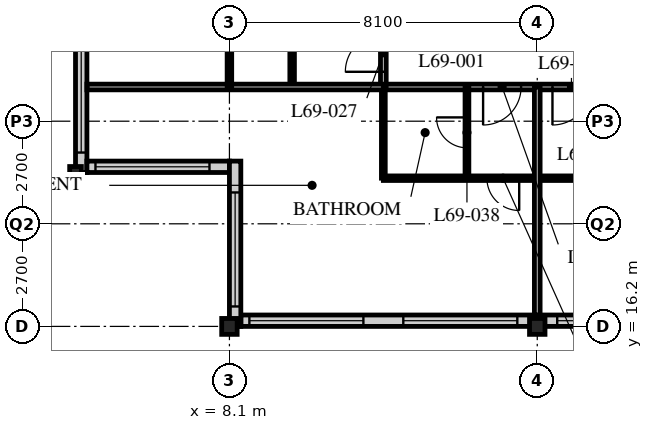
"""IFC4 building model, lengths in metres.
Left out: names, types, materials, properties, quantities, classifications, styles, units other than length and angle.
Written with IfcOpenShell. Run it as: python <this file> out.ifc"""

import sys

from ifc_helpers import new_model, si_unit, direction, frame, frame_2d, origin, origin_2d, place, context, subcontext, project, spatial, rectangle, i_section, extrude, element, fill, save


model = new_model("IFC4")
c1 = context("Model", 3, precision=1e-05, world=origin(), true_north=direction((0.0, 1.0)))
c2 = subcontext(c1, "Body", "Model", "MODEL_VIEW")
j1 = project(units=[si_unit("LENGTHUNIT", "METRE"), si_unit("PLANEANGLEUNIT", "RADIAN")], contexts=[c1])
p1 = place(None, origin())
s1 = spatial("IfcSite", under=j1, at=p1, CompositionType="ELEMENT")
p2 = place(p1, origin())
s2 = spatial("IfcBuilding", under=s1, at=p2, CompositionType="ELEMENT")
p3 = place(p2, frame((0.0, 0.0, 269.7)))
s3 = spatial("IfcBuildingStorey", under=s2, at=p3, CompositionType="ELEMENT", Elevation=269.7)
p4 = place(p3, frame((4.05, 20.25, 0.0), z_axis=(0.0, 0.0, 1.0), x_axis=(1.0, 0.0, 0.0)))
e1 = element("IfcColumn", 1, at=p4, inside=s3, PredefinedType="COLUMN", context=c2, shape_type="SweptSolid", body=[
    extrude(i_section(OverallWidth=0.307, OverallDepth=0.314, WebThickness=0.012, FlangeThickness=0.019, FilletRadius=0.015, at=origin_2d()), origin(), (0.0, 0.0, 1.0), 3.9),
])
for number, where, z_axis, x_axis in (
    (2, (8.1, 16.2, 0.0), (0.0, 0.0, 1.0), (1.0, 0.0, 0.0)),
    (3, (16.2, 16.2, 0.0), (0.0, 0.0, 1.0), (1.0, 0.0, 0.0)),
):
    element("IfcColumn", number, at=place(p3, frame(where, z_axis=z_axis, x_axis=x_axis)), inside=s3, PredefinedType="COLUMN", context=c2, shape_type="SweptSolid", body=[
        extrude(i_section(OverallWidth=0.407, OverallDepth=0.419, WebThickness=0.031, FlangeThickness=0.049, FilletRadius=0.015, at=origin_2d()), origin(), (0.0, 0.0, 1.0), 3.9),
    ])
p5 = place(p3, frame((8.4, 16.35, 0.0), z_axis=(0.0, 0.0, 1.0), x_axis=(1.0, 0.0, 0.0)))
e4 = element("IfcWall", 4, at=p5, inside=s3, PredefinedType="SOLIDWALL", context=c2, shape_type="SweptSolid", body=[
    extrude(rectangle(XDim=40.2, YDim=0.3, at=frame_2d((20.1, 0.0))), origin(), (0.0, 0.0, 1.0), 3.69),
])
p6 = place(p5, frame((0.225, 0.0, 0.6)))
e5 = element("IfcOpeningElement", 5, at=p6, cuts=e4, PredefinedType="OPENING", context=c2, shape_type="SweptSolid", body=[
    extrude(rectangle(XDim=3.0, YDim=2.4, at=frame_2d((1.5, 1.2))), frame((0.0, 0.16, 0.0), z_axis=(0.0, -1.0, 0.0), x_axis=(1.0, 0.0, 0.0)), (0.0, 0.0, 1.0), 0.32),
])
p7 = place(p5, frame((4.275, 0.0, 0.6)))
e6 = element("IfcOpeningElement", 6, at=p7, cuts=e4, PredefinedType="OPENING", context=c2, shape_type="SweptSolid", body=[
    extrude(rectangle(XDim=3.0, YDim=2.4, at=frame_2d((1.5, 1.2))), frame((0.0, 0.16, 0.0), z_axis=(0.0, -1.0, 0.0), x_axis=(1.0, 0.0, 0.0)), (0.0, 0.0, 1.0), 0.32),
])
p8 = place(p5, frame((8.325, 0.0, 0.6)))
e7 = element("IfcOpeningElement", 7, at=p8, cuts=e4, PredefinedType="OPENING", context=c2, shape_type="SweptSolid", body=[
    extrude(rectangle(XDim=3.0, YDim=2.4, at=frame_2d((1.5, 1.2))), frame((0.0, 0.16, 0.0), z_axis=(0.0, -1.0, 0.0), x_axis=(1.0, 0.0, 0.0)), (0.0, 0.0, 1.0), 0.32),
])
p9 = place(p5, frame((12.375, 0.0, 0.6)))
e8 = element("IfcOpeningElement", 8, at=p9, cuts=e4, PredefinedType="OPENING", context=c2, shape_type="SweptSolid", body=[
    extrude(rectangle(XDim=3.0, YDim=2.4, at=frame_2d((1.5, 1.2))), frame((0.0, 0.16, 0.0), z_axis=(0.0, -1.0, 0.0), x_axis=(1.0, 0.0, 0.0)), (0.0, 0.0, 1.0), 0.32),
])
p10 = place(p5, frame((16.425, 0.0, 0.6)))
e9 = element("IfcOpeningElement", 9, at=p10, cuts=e4, PredefinedType="OPENING", context=c2, shape_type="SweptSolid", body=[
    extrude(rectangle(XDim=3.0, YDim=2.4, at=frame_2d((1.5, 1.2))), frame((0.0, 0.16, 0.0), z_axis=(0.0, -1.0, 0.0), x_axis=(1.0, 0.0, 0.0)), (0.0, 0.0, 1.0), 0.32),
])
p11 = place(p5, frame((20.475, 0.0, 0.6)))
e10 = element("IfcOpeningElement", 10, at=p11, cuts=e4, PredefinedType="OPENING", context=c2, shape_type="SweptSolid", body=[
    extrude(rectangle(XDim=3.0, YDim=2.4, at=frame_2d((1.5, 1.2))), frame((0.0, 0.16, 0.0), z_axis=(0.0, -1.0, 0.0), x_axis=(1.0, 0.0, 0.0)), (0.0, 0.0, 1.0), 0.32),
])
p12 = place(p5, frame((24.525, 0.0, 0.6)))
e11 = element("IfcOpeningElement", 11, at=p12, cuts=e4, PredefinedType="OPENING", context=c2, shape_type="SweptSolid", body=[
    extrude(rectangle(XDim=3.0, YDim=2.4, at=frame_2d((1.5, 1.2))), frame((0.0, 0.16, 0.0), z_axis=(0.0, -1.0, 0.0), x_axis=(1.0, 0.0, 0.0)), (0.0, 0.0, 1.0), 0.32),
])
p13 = place(p5, frame((28.575, 0.0, 0.6)))
e12 = element("IfcOpeningElement", 12, at=p13, cuts=e4, PredefinedType="OPENING", context=c2, shape_type="SweptSolid", body=[
    extrude(rectangle(XDim=3.0, YDim=2.4, at=frame_2d((1.5, 1.2))), frame((0.0, 0.16, 0.0), z_axis=(0.0, -1.0, 0.0), x_axis=(1.0, 0.0, 0.0)), (0.0, 0.0, 1.0), 0.32),
])
p14 = place(p5, frame((32.625, 0.0, 0.6)))
e13 = element("IfcOpeningElement", 13, at=p14, cuts=e4, PredefinedType="OPENING", context=c2, shape_type="SweptSolid", body=[
    extrude(rectangle(XDim=3.0, YDim=2.4, at=frame_2d((1.5, 1.2))), frame((0.0, 0.16, 0.0), z_axis=(0.0, -1.0, 0.0), x_axis=(1.0, 0.0, 0.0)), (0.0, 0.0, 1.0), 0.32),
])
p15 = place(p5, frame((36.675, 0.0, 0.6)))
e14 = element("IfcOpeningElement", 14, at=p15, cuts=e4, PredefinedType="OPENING", context=c2, shape_type="SweptSolid", body=[
    extrude(rectangle(XDim=3.0, YDim=2.4, at=frame_2d((1.5, 1.2))), frame((0.0, 0.16, 0.0), z_axis=(0.0, -1.0, 0.0), x_axis=(1.0, 0.0, 0.0)), (0.0, 0.0, 1.0), 0.32),
])
p16 = place(p3, frame((4.2, 24.6, 0.0), z_axis=(0.0, 0.0, 1.0), x_axis=(0.0, -1.0, 0.0)))
e15 = element("IfcWall", 15, at=p16, inside=s3, PredefinedType="SOLIDWALL", context=c2, shape_type="SweptSolid", body=[
    extrude(rectangle(XDim=4.35, YDim=0.3, at=frame_2d((2.175, 0.0))), origin(), (0.0, 0.0, 1.0), 3.69),
])
p17 = place(p16, frame((0.825, 0.0, 0.6)))
e16 = element("IfcOpeningElement", 16, at=p17, cuts=e15, PredefinedType="OPENING", context=c2, shape_type="SweptSolid", body=[
    extrude(rectangle(XDim=3.0, YDim=2.3, at=frame_2d((1.5, 1.15))), frame((0.0, 0.16, 0.0), z_axis=(0.0, -1.0, 0.0), x_axis=(1.0, 0.0, 0.0)), (0.0, 0.0, 1.0), 0.32),
])
p18 = place(p3, frame((4.35, 20.4, 0.0), z_axis=(0.0, 0.0, 1.0), x_axis=(1.0, 0.0, 0.0)))
e17 = element("IfcWall", 17, at=p18, inside=s3, PredefinedType="SOLIDWALL", context=c2, shape_type="SweptSolid", body=[
    extrude(rectangle(XDim=3.75, YDim=0.3, at=frame_2d((1.875, 0.0))), origin(), (0.0, 0.0, 1.0), 3.69),
])
p19 = place(p18, frame((0.225, 0.0, 0.6)))
e18 = element("IfcOpeningElement", 18, at=p19, cuts=e17, PredefinedType="OPENING", context=c2, shape_type="SweptSolid", body=[
    extrude(rectangle(XDim=3.0, YDim=2.3, at=frame_2d((1.5, 1.15))), frame((0.0, 0.16, 0.0), z_axis=(0.0, -1.0, 0.0), x_axis=(1.0, 0.0, 0.0)), (0.0, 0.0, 1.0), 0.32),
])
p20 = place(p3, frame((8.25, 20.55, 0.0), z_axis=(0.0, 0.0, 1.0), x_axis=(0.0, -1.0, 0.0)))
e19 = element("IfcWall", 19, at=p20, inside=s3, PredefinedType="SOLIDWALL", context=c2, shape_type="SweptSolid", body=[
    extrude(rectangle(XDim=4.35, YDim=0.3, at=frame_2d((2.175, 0.0))), origin(), (0.0, 0.0, 1.0), 3.69),
])
p21 = place(p20, frame((0.825, 0.0, 0.6)))
e20 = element("IfcOpeningElement", 20, at=p21, cuts=e19, PredefinedType="OPENING", context=c2, shape_type="SweptSolid", body=[
    extrude(rectangle(XDim=3.0, YDim=2.3, at=frame_2d((1.5, 1.15))), frame((0.0, 0.16, 0.0), z_axis=(0.0, -1.0, 0.0), x_axis=(1.0, 0.0, 0.0)), (0.0, 0.0, 1.0), 0.32),
])
p22 = place(p3, frame((12.15, 22.5, 0.0), z_axis=(0.0, 0.0, 1.0), x_axis=(1.0, 0.0, 0.0)))
e21 = element("IfcWall", 21, at=p22, inside=s3, PredefinedType="PARTITIONING", context=c2, shape_type="SweptSolid", body=[
    extrude(rectangle(XDim=24.3, YDim=0.15, at=frame_2d((12.15, 0.0))), origin(), (0.0, 0.0, 1.0), 3.69),
])
p23 = place(p22, frame((4.45, 0.0, 0.0)))
e22 = element("IfcOpeningElement", 22, at=p23, cuts=e21, PredefinedType="OPENING", context=c2, shape_type="SweptSolid", body=[
    extrude(rectangle(XDim=1.0, YDim=2.1, at=frame_2d((0.5, 1.05))), frame((0.0, 0.085, 0.0), z_axis=(0.0, -1.0, 0.0), x_axis=(1.0, 0.0, 0.0)), (0.0, 0.0, 1.0), 0.17),
])
p24 = place(p22, frame((12.55, 0.0, 0.0)))
e23 = element("IfcOpeningElement", 23, at=p24, cuts=e21, PredefinedType="OPENING", context=c2, shape_type="SweptSolid", body=[
    extrude(rectangle(XDim=1.0, YDim=2.1, at=frame_2d((0.5, 1.05))), frame((0.0, 0.085, 0.0), z_axis=(0.0, -1.0, 0.0), x_axis=(1.0, 0.0, 0.0)), (0.0, 0.0, 1.0), 0.17),
])
p25 = place(p22, frame((2.625, 0.0, 0.0)))
e24 = element("IfcOpeningElement", 24, at=p25, cuts=e21, PredefinedType="OPENING", context=c2, shape_type="SweptSolid", body=[
    extrude(rectangle(XDim=1.0, YDim=2.1, at=frame_2d((0.5, 1.05))), frame((0.0, 0.085, 0.0), z_axis=(0.0, -1.0, 0.0), x_axis=(1.0, 0.0, 0.0)), (0.0, 0.0, 1.0), 0.17),
])
p26 = place(p3, frame((12.15, 22.5, 0.0), z_axis=(0.0, 0.0, 1.0), x_axis=(0.0, 1.0, 0.0)))
e25 = element("IfcWall", 25, at=p26, inside=s3, PredefinedType="PARTITIONING", context=c2, shape_type="SweptSolid", body=[
    extrude(rectangle(XDim=30.15, YDim=0.15, at=frame_2d((15.075, 0.0))), origin(), (0.0, 0.0, 1.0), 3.69),
])
p27 = place(p26, frame((0.4, 0.0, 0.0)))
e26 = element("IfcOpeningElement", 26, at=p27, cuts=e25, PredefinedType="OPENING", context=c2, shape_type="SweptSolid", body=[
    extrude(rectangle(XDim=1.0, YDim=2.1, at=frame_2d((0.5, 1.05))), frame((0.0, 0.085, 0.0), z_axis=(0.0, -1.0, 0.0), x_axis=(1.0, 0.0, 0.0)), (0.0, 0.0, 1.0), 0.17),
])
p28 = place(p26, frame((18.4, 0.0, 0.0)))
e27 = element("IfcOpeningElement", 27, at=p28, cuts=e25, PredefinedType="OPENING", context=c2, shape_type="SweptSolid", body=[
    extrude(rectangle(XDim=1.0, YDim=2.1, at=frame_2d((0.5, 1.05))), frame((0.0, 0.085, 0.0), z_axis=(0.0, -1.0, 0.0), x_axis=(1.0, 0.0, 0.0)), (0.0, 0.0, 1.0), 0.17),
])
p29 = place(p26, frame((28.45, 0.0, 0.0)))
e28 = element("IfcOpeningElement", 28, at=p29, cuts=e25, PredefinedType="OPENING", context=c2, shape_type="SweptSolid", body=[
    extrude(rectangle(XDim=1.0, YDim=2.1, at=frame_2d((0.5, 1.05))), frame((0.0, 0.085, 0.0), z_axis=(0.0, -1.0, 0.0), x_axis=(1.0, 0.0, 0.0)), (0.0, 0.0, 1.0), 0.17),
])
p30 = place(p3, frame((9.75, 22.5, 0.0), z_axis=(0.0, 0.0, 1.0), x_axis=(0.0, 1.0, 0.0)))
e29 = element("IfcWall", 29, at=p30, inside=s3, PredefinedType="PARTITIONING", context=c2, shape_type="SweptSolid", body=[
    extrude(rectangle(XDim=26.1, YDim=0.12, at=frame_2d((13.05, 0.0))), origin(), (0.0, 0.0, 1.0), 3.69),
])
p31 = place(p30, frame((0.975, 0.0, 0.0)))
e30 = element("IfcOpeningElement", 30, at=p31, cuts=e29, PredefinedType="OPENING", context=c2, shape_type="SweptSolid", body=[
    extrude(rectangle(XDim=0.85, YDim=2.1, at=frame_2d((0.425, 1.05))), frame((0.0, 0.07, 0.0), z_axis=(0.0, -1.0, 0.0), x_axis=(1.0, 0.0, 0.0)), (0.0, 0.0, 1.0), 0.14),
])
p32 = place(p30, frame((10.225, 0.0, 0.0)))
e31 = element("IfcOpeningElement", 31, at=p32, cuts=e29, PredefinedType="OPENING", context=c2, shape_type="SweptSolid", body=[
    extrude(rectangle(XDim=0.85, YDim=2.1, at=frame_2d((0.425, 1.05))), frame((0.0, 0.07, 0.0), z_axis=(0.0, -1.0, 0.0), x_axis=(1.0, 0.0, 0.0)), (0.0, 0.0, 1.0), 0.14),
])
p33 = place(p30, frame((14.275, 0.0, 0.0)))
e32 = element("IfcOpeningElement", 32, at=p33, cuts=e29, PredefinedType="OPENING", context=c2, shape_type="SweptSolid", body=[
    extrude(rectangle(XDim=0.85, YDim=2.1, at=frame_2d((0.425, 1.05))), frame((0.0, 0.07, 0.0), z_axis=(0.0, -1.0, 0.0), x_axis=(1.0, 0.0, 0.0)), (0.0, 0.0, 1.0), 0.14),
])
p34 = place(p30, frame((18.975, 0.0, 0.0)))
e33 = element("IfcOpeningElement", 33, at=p34, cuts=e29, PredefinedType="OPENING", context=c2, shape_type="SweptSolid", body=[
    extrude(rectangle(XDim=0.85, YDim=2.1, at=frame_2d((0.425, 1.05))), frame((0.0, 0.07, 0.0), z_axis=(0.0, -1.0, 0.0), x_axis=(1.0, 0.0, 0.0)), (0.0, 0.0, 1.0), 0.14),
])
p35 = place(p30, frame((22.375, 0.0, 0.0)))
e34 = element("IfcOpeningElement", 34, at=p35, cuts=e29, PredefinedType="OPENING", context=c2, shape_type="SweptSolid", body=[
    extrude(rectangle(XDim=0.85, YDim=2.1, at=frame_2d((0.425, 1.05))), frame((0.0, 0.07, 0.0), z_axis=(0.0, -1.0, 0.0), x_axis=(1.0, 0.0, 0.0)), (0.0, 0.0, 1.0), 0.14),
])
p36 = place(p3, frame((12.15, 20.1, 0.0), z_axis=(0.0, 0.0, 1.0), x_axis=(1.0, 0.0, 0.0)))
e35 = element("IfcWall", 35, at=p36, inside=s3, PredefinedType="PARTITIONING", context=c2, shape_type="SweptSolid", body=[
    extrude(rectangle(XDim=24.3, YDim=0.12, at=frame_2d((12.15, 0.0))), origin(), (0.0, 0.0, 1.0), 3.69),
])
p37 = place(p36, frame((5.025, 0.0, 0.0)))
e36 = element("IfcOpeningElement", 36, at=p37, cuts=e35, PredefinedType="OPENING", context=c2, shape_type="SweptSolid", body=[
    extrude(rectangle(XDim=0.85, YDim=2.1, at=frame_2d((0.425, 1.05))), frame((0.0, 0.07, 0.0), z_axis=(0.0, -1.0, 0.0), x_axis=(1.0, 0.0, 0.0)), (0.0, 0.0, 1.0), 0.14),
])
p38 = place(p36, frame((8.425, 0.0, 0.0)))
e37 = element("IfcOpeningElement", 37, at=p38, cuts=e35, PredefinedType="OPENING", context=c2, shape_type="SweptSolid", body=[
    extrude(rectangle(XDim=0.85, YDim=2.1, at=frame_2d((0.425, 1.05))), frame((0.0, 0.07, 0.0), z_axis=(0.0, -1.0, 0.0), x_axis=(1.0, 0.0, 0.0)), (0.0, 0.0, 1.0), 0.14),
])
p39 = place(p36, frame((13.125, 0.0, 0.0)))
e38 = element("IfcOpeningElement", 38, at=p39, cuts=e35, PredefinedType="OPENING", context=c2, shape_type="SweptSolid", body=[
    extrude(rectangle(XDim=0.85, YDim=2.1, at=frame_2d((0.425, 1.05))), frame((0.0, 0.07, 0.0), z_axis=(0.0, -1.0, 0.0), x_axis=(1.0, 0.0, 0.0)), (0.0, 0.0, 1.0), 0.14),
])
p40 = place(p36, frame((20.575, 0.0, 0.0)))
e39 = element("IfcOpeningElement", 39, at=p40, cuts=e35, PredefinedType="OPENING", context=c2, shape_type="SweptSolid", body=[
    extrude(rectangle(XDim=0.85, YDim=2.1, at=frame_2d((0.425, 1.05))), frame((0.0, 0.07, 0.0), z_axis=(0.0, -1.0, 0.0), x_axis=(1.0, 0.0, 0.0)), (0.0, 0.0, 1.0), 0.14),
])
p41 = place(p36, frame((2.725, 0.0, 0.0)))
e40 = element("IfcOpeningElement", 40, at=p41, cuts=e35, PredefinedType="OPENING", context=c2, shape_type="SweptSolid", body=[
    extrude(rectangle(XDim=0.85, YDim=2.1, at=frame_2d((0.425, 1.05))), frame((0.0, 0.07, 0.0), z_axis=(0.0, -1.0, 0.0), x_axis=(1.0, 0.0, 0.0)), (0.0, 0.0, 1.0), 0.14),
])
p42 = place(p3, frame((14.35, 22.5, 0.0), z_axis=(0.0, 0.0, 1.0), x_axis=(0.0, -1.0, 0.0)))
e41 = element("IfcWall", 41, at=p42, inside=s3, PredefinedType="PARTITIONING", context=c2, shape_type="SweptSolid", body=[
    extrude(rectangle(XDim=2.4, YDim=0.1, at=frame_2d((1.2, 0.0))), origin(), (0.0, 0.0, 1.0), 3.69),
])
p43 = place(p42, frame((0.8, 0.0, 0.0)))
e42 = element("IfcOpeningElement", 42, at=p43, cuts=e41, PredefinedType="OPENING", context=c2, shape_type="SweptSolid", body=[
    extrude(rectangle(XDim=0.8, YDim=2.1, at=frame_2d((0.4, 1.05))), frame((0.0, 0.06, 0.0), z_axis=(0.0, -1.0, 0.0), x_axis=(1.0, 0.0, 0.0)), (0.0, 0.0, 1.0), 0.12),
])
p44 = place(p3, frame((12.15, 22.5, 0.0), z_axis=(0.0, 0.0, 1.0), x_axis=(0.0, -1.0, 0.0)))
e43 = element("IfcWall", 43, at=p44, inside=s3, PredefinedType="PARTITIONING", context=c2, shape_type="SweptSolid", body=[
    extrude(rectangle(XDim=2.4, YDim=0.1, at=frame_2d((1.2, 0.0))), origin(), (0.0, 0.0, 1.0), 3.69),
])
p45 = place(p3, frame((4.35, 22.5, 0.0), z_axis=(0.0, 0.0, 1.0), x_axis=(1.0, 0.0, 0.0)))
e44 = element("IfcWall", 44, at=p45, inside=s3, PredefinedType="PARTITIONING", context=c2, shape_type="SweptSolid", body=[
    extrude(rectangle(XDim=7.8, YDim=0.15, at=frame_2d((3.9, 0.0))), origin(), (0.0, 0.0, 1.0), 3.69),
])
p46 = place(p3, frame((16.2, 22.5, 0.0), z_axis=(0.0, 0.0, 1.0), x_axis=(0.0, -1.0, 0.0)))
e45 = element("IfcWall", 45, at=p46, inside=s3, PredefinedType="PARTITIONING", context=c2, shape_type="SweptSolid", body=[
    extrude(rectangle(XDim=6.0, YDim=0.15, at=frame_2d((3.0, 0.0))), origin(), (0.0, 0.0, 1.0), 3.078),
])
p47 = place(p3, frame((8.1, 22.5, 0.0), z_axis=(0.0, 0.0, 1.0), x_axis=(0.0, 1.0, 0.0)))
e46 = element("IfcWall", 46, at=p47, inside=s3, PredefinedType="PARTITIONING", context=c2, shape_type="SweptSolid", body=[
    extrude(rectangle(XDim=1.597, YDim=0.12, at=frame_2d((0.798, 0.0))), origin(), (0.0, 0.0, 1.0), 3.078),
])
p48 = place(p6, origin())
e47 = element("IfcWindow", 47, at=p48, inside=s3, PartitioningType="SINGLE_PANEL", PredefinedType="WINDOW", context=c2, shape_type="SweptSolid", body=[
    extrude(rectangle(XDim=3.0, YDim=2.4, at=frame_2d((1.5, 1.2))), frame((0.0, 0.03, 0.0), z_axis=(0.0, -1.0, 0.0), x_axis=(1.0, 0.0, 0.0)), (0.0, 0.0, 1.0), 0.06),
])
fill(e5, e47)
p49 = place(p7, origin())
e48 = element("IfcWindow", 48, at=p49, inside=s3, PartitioningType="SINGLE_PANEL", PredefinedType="WINDOW", context=c2, shape_type="SweptSolid", body=[
    extrude(rectangle(XDim=3.0, YDim=2.4, at=frame_2d((1.5, 1.2))), frame((0.0, 0.03, 0.0), z_axis=(0.0, -1.0, 0.0), x_axis=(1.0, 0.0, 0.0)), (0.0, 0.0, 1.0), 0.06),
])
fill(e6, e48)
p50 = place(p8, origin())
e49 = element("IfcWindow", 49, at=p50, inside=s3, PartitioningType="SINGLE_PANEL", PredefinedType="WINDOW", context=c2, shape_type="SweptSolid", body=[
    extrude(rectangle(XDim=3.0, YDim=2.4, at=frame_2d((1.5, 1.2))), frame((0.0, 0.03, 0.0), z_axis=(0.0, -1.0, 0.0), x_axis=(1.0, 0.0, 0.0)), (0.0, 0.0, 1.0), 0.06),
])
fill(e7, e49)
p51 = place(p17, origin())
e50 = element("IfcWindow", 50, at=p51, inside=s3, PartitioningType="SINGLE_PANEL", PredefinedType="WINDOW", context=c2, shape_type="SweptSolid", body=[
    extrude(rectangle(XDim=3.0, YDim=2.3, at=frame_2d((1.5, 1.15))), frame((0.0, 0.03, 0.0), z_axis=(0.0, -1.0, 0.0), x_axis=(1.0, 0.0, 0.0)), (0.0, 0.0, 1.0), 0.06),
])
fill(e16, e50)
p52 = place(p19, origin())
e51 = element("IfcWindow", 51, at=p52, inside=s3, PartitioningType="SINGLE_PANEL", PredefinedType="WINDOW", context=c2, shape_type="SweptSolid", body=[
    extrude(rectangle(XDim=3.0, YDim=2.3, at=frame_2d((1.5, 1.15))), frame((0.0, 0.03, 0.0), z_axis=(0.0, -1.0, 0.0), x_axis=(1.0, 0.0, 0.0)), (0.0, 0.0, 1.0), 0.06),
])
fill(e18, e51)
p53 = place(p21, origin())
e52 = element("IfcWindow", 52, at=p53, inside=s3, PartitioningType="SINGLE_PANEL", PredefinedType="WINDOW", context=c2, shape_type="SweptSolid", body=[
    extrude(rectangle(XDim=3.0, YDim=2.3, at=frame_2d((1.5, 1.15))), frame((0.0, 0.03, 0.0), z_axis=(0.0, -1.0, 0.0), x_axis=(1.0, 0.0, 0.0)), (0.0, 0.0, 1.0), 0.06),
])
fill(e20, e52)
p54 = place(p23, origin())
e53 = element("IfcDoor", 53, at=p54, inside=s3, OperationType="SINGLE_SWING_RIGHT", PredefinedType="DOOR", context=c2, shape_type="SweptSolid", body=[
    extrude(rectangle(XDim=1.0, YDim=2.1, at=frame_2d((0.5, 1.05))), frame((0.0, 0.025, 0.0), z_axis=(0.0, -1.0, 0.0), x_axis=(1.0, 0.0, 0.0)), (0.0, 0.0, 1.0), 0.05),
])
fill(e22, e53)
p55 = place(p27, origin())
e54 = element("IfcDoor", 54, at=p55, inside=s3, OperationType="SINGLE_SWING_LEFT", PredefinedType="DOOR", context=c2, shape_type="SweptSolid", body=[
    extrude(rectangle(XDim=1.0, YDim=2.1, at=frame_2d((0.5, 1.05))), frame((0.0, 0.025, 0.0), z_axis=(0.0, -1.0, 0.0), x_axis=(1.0, 0.0, 0.0)), (0.0, 0.0, 1.0), 0.05),
])
fill(e26, e54)
p56 = place(p43, origin())
e55 = element("IfcDoor", 55, at=p56, inside=s3, OperationType="SINGLE_SWING_RIGHT", PredefinedType="DOOR", context=c2, shape_type="SweptSolid", body=[
    extrude(rectangle(XDim=0.8, YDim=2.1, at=frame_2d((0.4, 1.05))), frame((0.0, 0.025, 0.0), z_axis=(0.0, -1.0, 0.0), x_axis=(1.0, 0.0, 0.0)), (0.0, 0.0, 1.0), 0.05),
])
fill(e42, e55)
p57 = place(p25, origin())
e56 = element("IfcDoor", 56, at=p57, inside=s3, OperationType="SINGLE_SWING_RIGHT", PredefinedType="DOOR", context=c2, shape_type="SweptSolid", body=[
    extrude(rectangle(XDim=1.0, YDim=2.1, at=frame_2d((0.5, 1.05))), frame((0.0, 0.025, 0.0), z_axis=(0.0, -1.0, 0.0), x_axis=(1.0, 0.0, 0.0)), (0.0, 0.0, 1.0), 0.05),
])
fill(e24, e56)
p58 = place(p41, origin())
e57 = element("IfcDoor", 57, at=p58, inside=s3, OperationType="SINGLE_SWING_LEFT", PredefinedType="DOOR", context=c2, shape_type="SweptSolid", body=[
    extrude(rectangle(XDim=0.85, YDim=2.1, at=frame_2d((0.425, 1.05))), frame((0.0, 0.025, 0.0), z_axis=(0.0, -1.0, 0.0), x_axis=(1.0, 0.0, 0.0)), (0.0, 0.0, 1.0), 0.05),
])
fill(e40, e57)
save(model, sys.argv[1])
